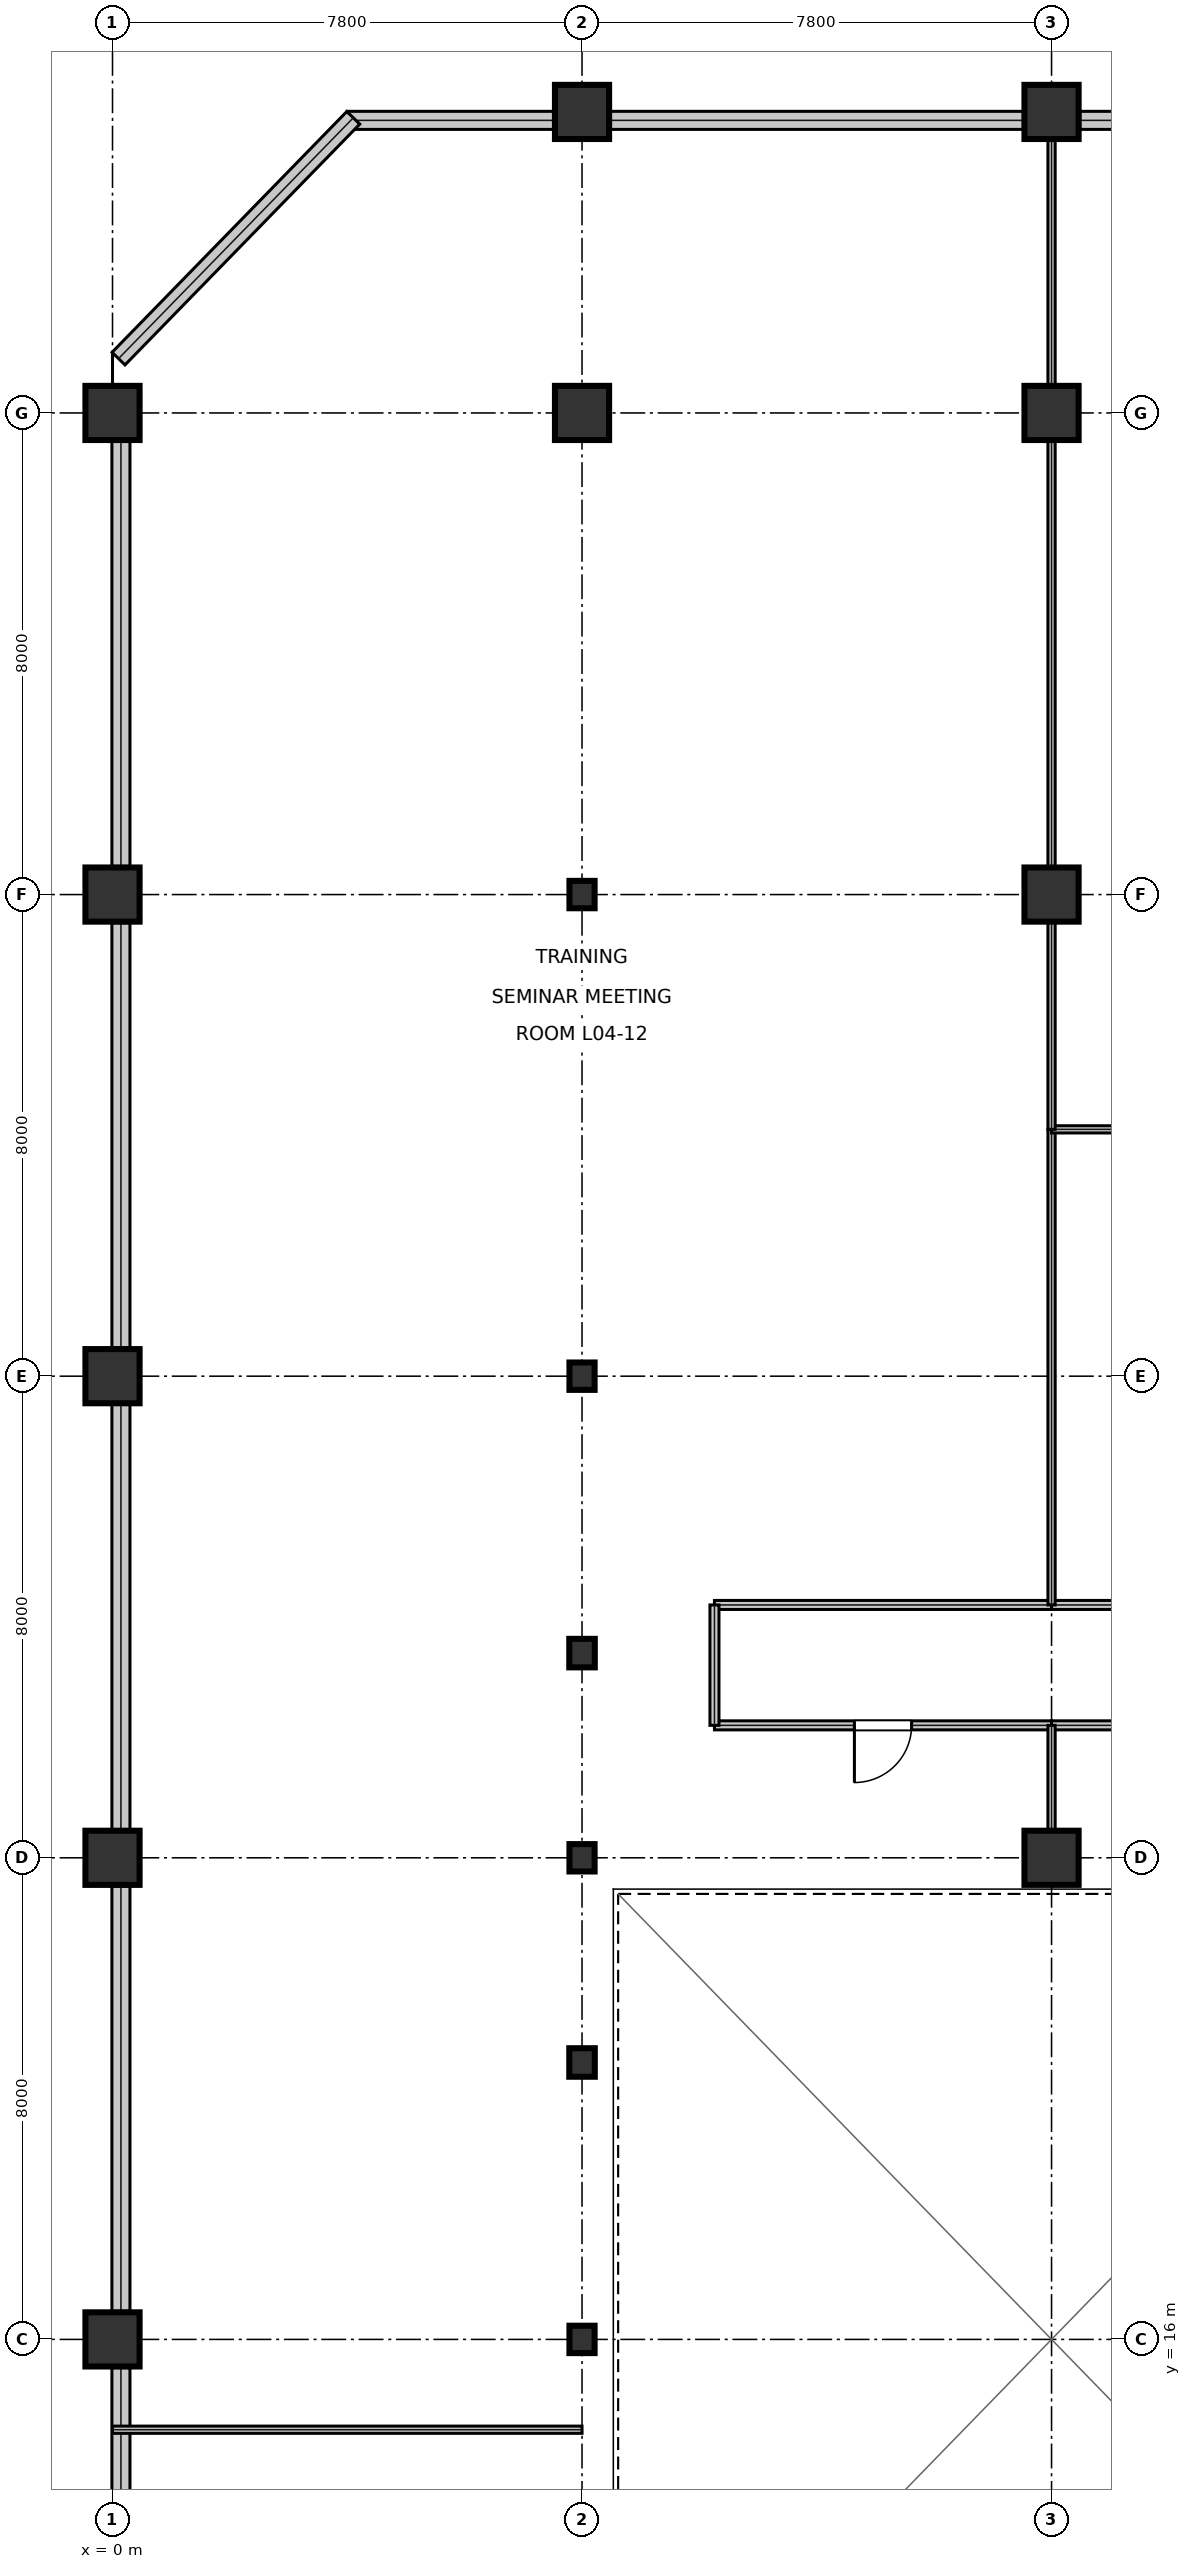
"""IFC4 building model, lengths in metres.
Left out: names, types, materials, properties, quantities, classifications, styles, units other than length and angle.
Written with IfcOpenShell. Run it as: python <this file> out.ifc"""

import sys

from ifc_helpers import new_model, si_unit, direction, frame, frame_2d, origin, origin_2d, place, context, subcontext, project, spatial, rectangle, i_section, extrude, element, fill, save


model = new_model("IFC4")
c1 = context("Model", 3, precision=1e-05, world=origin(), true_north=direction((0.0, 1.0)))
c2 = subcontext(c1, "Body", "Model", "MODEL_VIEW")
j1 = project(units=[si_unit("LENGTHUNIT", "METRE"), si_unit("PLANEANGLEUNIT", "RADIAN")], contexts=[c1])
p1 = place(None, origin())
s1 = spatial("IfcSite", under=j1, at=p1, CompositionType="ELEMENT")
p2 = place(p1, origin())
s2 = spatial("IfcBuilding", under=s1, at=p2, CompositionType="ELEMENT")
p3 = place(p2, frame((0.0, 0.0, 21.6)))
s3 = spatial("IfcBuildingStorey", under=s2, at=p3, CompositionType="ELEMENT", Elevation=21.6)
for number, where, z_axis, x_axis in (
    (1, (0.0, 16.0, 0.0), (0.0, 0.0, 1.0), (1.0, 0.0, 0.0)),
    (2, (0.0, 24.0, 0.0), (0.0, 0.0, 1.0), (1.0, 0.0, 0.0)),
    (3, (0.0, 32.0, 0.0), (0.0, 0.0, 1.0), (1.0, 0.0, 0.0)),
    (4, (0.0, 40.0, 0.0), (0.0, 0.0, 1.0), (1.0, 0.0, 0.0)),
    (5, (0.0, 48.0, 0.0), (0.0, 0.0, 1.0), (1.0, 0.0, 0.0)),
):
    element("IfcColumn", number, at=place(p3, frame(where, z_axis=z_axis, x_axis=x_axis)), inside=s3, PredefinedType="COLUMN", context=c2, shape_type="SweptSolid", body=[
        extrude(rectangle(XDim=0.9, YDim=0.9, at=origin_2d()), origin(), (0.0, 0.0, 1.0), 5.395),
    ])
for number, where, z_axis, x_axis in (
    (6, (7.8, 16.0, 0.0), (0.0, 0.0, 1.0), (1.0, 0.0, 0.0)),
    (7, (7.8, 24.0, 0.0), (0.0, 0.0, 1.0), (1.0, 0.0, 0.0)),
    (8, (7.8, 32.0, 0.0), (0.0, 0.0, 1.0), (1.0, 0.0, 0.0)),
    (9, (7.8, 40.0, 0.0), (0.0, 0.0, 1.0), (1.0, 0.0, 0.0)),
):
    element("IfcColumn", number, at=place(p3, frame(where, z_axis=z_axis, x_axis=x_axis)), inside=s3, PredefinedType="COLUMN", context=c2, shape_type="SweptSolid", body=[
        extrude(i_section(OverallWidth=0.418, OverallDepth=0.455, WebThickness=0.042, FlangeThickness=0.068, at=origin_2d()), origin(), (0.0, 0.0, 1.0), 5.395),
    ])
for number, where, z_axis, x_axis in (
    (10, (7.8, 48.0, 0.0), (0.0, 0.0, 1.0), (1.0, 0.0, 0.0)),
    (11, (7.8, 53.0, 0.0), (0.0, 0.0, 1.0), (1.0, 0.0, 0.0)),
    (12, (15.6, 24.0, 0.0), (0.0, 0.0, 1.0), (1.0, 0.0, 0.0)),
    (13, (15.6, 40.0, 0.0), (0.0, 0.0, 1.0), (1.0, 0.0, 0.0)),
    (14, (15.6, 48.0, 0.0), (0.0, 0.0, 1.0), (1.0, 0.0, 0.0)),
    (15, (15.6, 53.0, 0.0), (0.0, 0.0, 1.0), (1.0, 0.0, 0.0)),
):
    element("IfcColumn", number, at=place(p3, frame(where, z_axis=z_axis, x_axis=x_axis)), inside=s3, PredefinedType="COLUMN", context=c2, shape_type="SweptSolid", body=[
        extrude(rectangle(XDim=0.9, YDim=0.9, at=origin_2d()), origin(), (0.0, 0.0, 1.0), 5.395),
    ])
for number, where, z_axis, x_axis in (
    (16, (7.8, 20.6, 0.0), (0.0, 0.0, 1.0), (1.0, 0.0, 0.0)),
    (17, (7.8, 27.4, 0.0), (0.0, 0.0, 1.0), (1.0, 0.0, 0.0)),
):
    element("IfcColumn", number, at=place(p3, frame(where, z_axis=z_axis, x_axis=x_axis)), inside=s3, PredefinedType="COLUMN", context=c2, shape_type="SweptSolid", body=[
        extrude(i_section(OverallWidth=0.424, OverallDepth=0.474, WebThickness=0.048, FlangeThickness=0.077, at=origin_2d()), origin(), (0.0, 0.0, 1.0), 5.394),
    ])
p4 = place(p3, frame((22.932, 52.86, 0.0), z_axis=(0.0, 0.0, 1.0), x_axis=(-1.0, 0.0, 0.0)))
e18 = element("IfcWall", 18, at=p4, inside=s3, PredefinedType="STANDARD", context=c2, shape_type="SweptSolid", body=[
    extrude(rectangle(XDim=6.864, YDim=0.3, at=frame_2d((3.432, 0.0))), origin(), (0.0, 0.0, 1.0), 4.608),
])
p5 = place(p3, frame((15.132, 52.86, 0.0), z_axis=(0.0, 0.0, 1.0), x_axis=(-1.0, 0.0, 0.0)))
e19 = element("IfcWall", 19, at=p5, inside=s3, PredefinedType="STANDARD", context=c2, shape_type="SweptSolid", body=[
    extrude(rectangle(XDim=6.864, YDim=0.3, at=frame_2d((3.432, 0.0))), origin(), (0.0, 0.0, 1.0), 4.608),
])
p6 = place(p3, frame((7.332, 52.86, 0.0), z_axis=(0.0, 0.0, 1.0), x_axis=(-1.0, 0.0, 0.0)))
e20 = element("IfcWall", 20, at=p6, inside=s3, PredefinedType="STANDARD", context=c2, shape_type="SweptSolid", body=[
    extrude(rectangle(XDim=3.432, YDim=0.3, at=frame_2d((1.716, 0.0))), origin(), (0.0, 0.0, 1.0), 5.08),
])
p7 = place(p3, frame((4.0, 52.902, 0.0), z_axis=(0.0, 0.0, 1.0), x_axis=(-0.698113577969, -0.71598703358, 0.0)))
e21 = element("IfcWall", 21, at=p7, inside=s3, PredefinedType="STANDARD", context=c2, shape_type="SweptSolid", body=[
    extrude(rectangle(XDim=5.587, YDim=0.3, at=frame_2d((2.793, 0.0))), origin(), (0.0, 0.0, 1.0), 5.08),
])
for number, where, z_axis, x_axis in (
    (22, (0.14, 47.532, 0.0), (0.0, 0.0, 1.0), (0.0, -1.0, 0.0)),
    (23, (0.14, 39.532, 0.0), (0.0, 0.0, 1.0), (0.0, -1.0, 0.0)),
    (24, (0.14, 31.532, 0.0), (0.0, 0.0, 1.0), (0.0, -1.0, 0.0)),
    (25, (0.14, 23.532, 0.0), (0.0, 0.0, 1.0), (0.0, -1.0, 0.0)),
    (26, (0.14, 15.532, 0.0), (0.0, 0.0, 1.0), (0.0, -1.0, 0.0)),
):
    element("IfcWall", number, at=place(p3, frame(where, z_axis=z_axis, x_axis=x_axis)), inside=s3, PredefinedType="STANDARD", context=c2, shape_type="SweptSolid", body=[
        extrude(rectangle(XDim=7.064, YDim=0.3, at=frame_2d((3.532, 0.0))), origin(), (0.0, 0.0, 1.0), 4.608),
    ])
p8 = place(p3, frame((15.6, 28.2, 0.0), z_axis=(0.0, 0.0, 1.0), x_axis=(1.0, 0.0, 0.0)))
e27 = element("IfcWall", 27, at=p8, inside=s3, PredefinedType="PARTITIONING", context=c2, shape_type="SweptSolid", body=[
    extrude(rectangle(XDim=10.6, YDim=0.15, at=frame_2d((5.3, 0.0))), origin(), (0.0, 0.0, 1.0), 3.648),
])
p9 = place(p8, frame((4.825, 0.0, 0.0)))
e28 = element("IfcOpeningElement", 28, at=p9, cuts=e27, PredefinedType="OPENING", context=c2, shape_type="SweptSolid", body=[
    extrude(rectangle(XDim=0.95, YDim=2.15, at=frame_2d((0.475, 1.075))), frame((0.0, 0.085, 0.0), z_axis=(0.0, -1.0, 0.0), x_axis=(1.0, 0.0, 0.0)), (0.0, 0.0, 1.0), 0.17),
])
p10 = place(p3, frame((10.0, 26.2, 0.0), z_axis=(0.0, 0.0, 1.0), x_axis=(1.0, 0.0, 0.0)))
e29 = element("IfcWall", 29, at=p10, inside=s3, PredefinedType="PARTITIONING", context=c2, shape_type="SweptSolid", body=[
    extrude(rectangle(XDim=5.6, YDim=0.15, at=frame_2d((2.8, 0.0))), origin(), (0.0, 0.0, 1.0), 3.648),
])
p11 = place(p10, frame((2.325, 0.0, 0.0)))
e30 = element("IfcOpeningElement", 30, at=p11, cuts=e29, PredefinedType="OPENING", context=c2, shape_type="SweptSolid", body=[
    extrude(rectangle(XDim=0.95, YDim=2.15, at=frame_2d((0.475, 1.075))), frame((0.0, 0.085, 0.0), z_axis=(0.0, -1.0, 0.0), x_axis=(1.0, 0.0, 0.0)), (0.0, 0.0, 1.0), 0.17),
])
p12 = place(p3, frame((15.6, 26.2, 0.0), z_axis=(0.0, 0.0, 1.0), x_axis=(1.0, 0.0, 0.0)))
e31 = element("IfcWall", 31, at=p12, inside=s3, PredefinedType="PARTITIONING", context=c2, shape_type="SweptSolid", body=[
    extrude(rectangle(XDim=10.6, YDim=0.15, at=frame_2d((5.3, 0.0))), origin(), (0.0, 0.0, 1.0), 3.648),
])
p13 = place(p3, frame((10.0, 28.2, 0.0), z_axis=(0.0, 0.0, 1.0), x_axis=(1.0, 0.0, 0.0)))
e32 = element("IfcWall", 32, at=p13, inside=s3, PredefinedType="PARTITIONING", context=c2, shape_type="SweptSolid", body=[
    extrude(rectangle(XDim=5.6, YDim=0.15, at=frame_2d((2.8, 0.0))), origin(), (0.0, 0.0, 1.0), 3.648),
])
p14 = place(p3, frame((10.0, 26.2, 0.0), z_axis=(0.0, 0.0, 1.0), x_axis=(0.0, 1.0, 0.0)))
e33 = element("IfcWall", 33, at=p14, inside=s3, PredefinedType="PARTITIONING", context=c2, shape_type="SweptSolid", body=[
    extrude(rectangle(XDim=2.0, YDim=0.15, at=frame_2d((1.0, 0.0))), origin(), (0.0, 0.0, 1.0), 5.08),
])
p15 = place(p3, frame((0.0, 14.5, 0.0), z_axis=(0.0, 0.0, 1.0), x_axis=(1.0, 0.0, 0.0)))
e34 = element("IfcWall", 34, at=p15, inside=s3, PredefinedType="PARTITIONING", context=c2, shape_type="SweptSolid", body=[
    extrude(rectangle(XDim=7.8, YDim=0.12, at=frame_2d((3.9, 0.0))), origin(), (0.0, 0.0, 1.0), 5.08),
])
p16 = place(p3, frame((15.6, 24.0, 0.0), z_axis=(0.0, 0.0, 1.0), x_axis=(0.0, 1.0, 0.0)))
e35 = element("IfcWall", 35, at=p16, inside=s3, PredefinedType="PARTITIONING", context=c2, shape_type="SweptSolid", body=[
    extrude(rectangle(XDim=2.2, YDim=0.12, at=frame_2d((1.1, 0.0))), origin(), (0.0, 0.0, 1.0), 3.648),
])
p17 = place(p3, frame((15.6, 28.2, 0.0), z_axis=(0.0, 0.0, 1.0), x_axis=(0.0, 1.0, 0.0)))
e36 = element("IfcWall", 36, at=p17, inside=s3, PredefinedType="PARTITIONING", context=c2, shape_type="SweptSolid", body=[
    extrude(rectangle(XDim=7.9, YDim=0.12, at=frame_2d((3.95, 0.0))), origin(), (0.0, 0.0, 1.0), 3.648),
])
p18 = place(p3, frame((15.6, 36.1, 0.0), z_axis=(0.0, 0.0, 1.0), x_axis=(1.0, 0.0, 0.0)))
e37 = element("IfcWall", 37, at=p18, inside=s3, PredefinedType="PARTITIONING", context=c2, shape_type="SweptSolid", body=[
    extrude(rectangle(XDim=10.6, YDim=0.12, at=frame_2d((5.3, 0.0))), origin(), (0.0, 0.0, 1.0), 3.648),
])
p19 = place(p3, frame((15.6, 36.1, 0.0), z_axis=(0.0, 0.0, 1.0), x_axis=(0.0, 1.0, 0.0)))
e38 = element("IfcWall", 38, at=p19, inside=s3, PredefinedType="PARTITIONING", context=c2, shape_type="SweptSolid", body=[
    extrude(rectangle(XDim=16.9, YDim=0.12, at=frame_2d((8.45, 0.0))), origin(), (0.0, 0.0, 1.0), 3.648),
])
p20 = place(p11, frame((0.95, 0.0, 0.0), z_axis=(0.0, 0.0, 1.0), x_axis=(-1.0, 0.0, 0.0)))
e39 = element("IfcDoor", 39, at=p20, inside=s3, OperationType="SINGLE_SWING_RIGHT", PredefinedType="DOOR", context=c2, shape_type="SweptSolid", body=[
    extrude(rectangle(XDim=0.95, YDim=2.15, at=frame_2d((0.475, 1.075))), frame((0.0, 0.025, 0.0), z_axis=(0.0, -1.0, 0.0), x_axis=(1.0, 0.0, 0.0)), (0.0, 0.0, 1.0), 0.05),
])
fill(e30, e39)
save(model, sys.argv[1])
